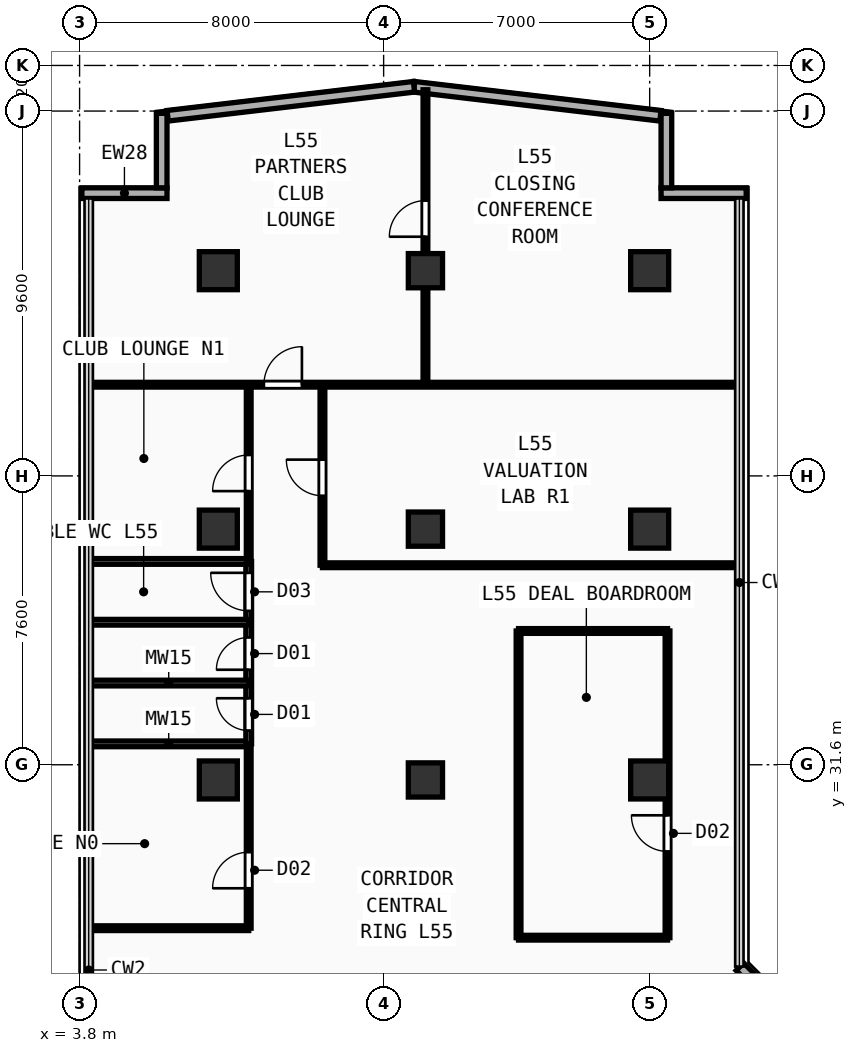
"""IFC4 building model, lengths in metres.
Left out: names, types, materials, properties, quantities, classifications, styles, units other than length and angle.
Written with IfcOpenShell. Run it as: python <this file> out.ifc"""

import sys

from ifc_helpers import new_model, si_unit, direction, frame, frame_2d, origin, origin_2d, place, context, subcontext, project, spatial, rectangle, extrude, element, fill, save


model = new_model("IFC4")
c1 = context("Model", 3, precision=1e-05, world=origin(), true_north=direction((0.0, 1.0)))
c2 = subcontext(c1, "Body", "Model", "MODEL_VIEW")
j1 = project(units=[si_unit("LENGTHUNIT", "METRE"), si_unit("PLANEANGLEUNIT", "RADIAN")], contexts=[c1])
p1 = place(None, origin())
s1 = spatial("IfcSite", under=j1, at=p1, CompositionType="ELEMENT")
p2 = place(p1, origin())
s2 = spatial("IfcBuilding", under=s1, at=p2, CompositionType="ELEMENT")
p3 = place(p2, frame((0.0, 0.0, 215.9)))
s3 = spatial("IfcBuildingStorey", under=s2, at=p3, CompositionType="ELEMENT", Elevation=215.9)
for number, where, z_axis, x_axis in (
    (1, (7.45, 31.2, 0.0), (0.0, 0.0, 1.0), (1.0, 0.0, 0.0)),
    (2, (7.45, 37.8, 0.0), (0.0, 0.0, 1.0), (1.0, 0.0, 0.0)),
    (3, (7.45, 44.6, 0.0), (0.0, 0.0, 1.0), (1.0, 0.0, 0.0)),
    (4, (18.8, 31.2, 0.0), (0.0, 0.0, 1.0), (1.0, 0.0, 0.0)),
    (5, (18.8, 37.8, 0.0), (0.0, 0.0, 1.0), (1.0, 0.0, 0.0)),
    (6, (18.8, 44.6, 0.0), (0.0, 0.0, 1.0), (1.0, 0.0, 0.0)),
):
    element("IfcColumn", number, at=place(p3, frame(where, z_axis=z_axis, x_axis=x_axis)), inside=s3, PredefinedType="COLUMN", context=c2, shape_type="SweptSolid", body=[
        extrude(rectangle(XDim=1.0, YDim=1.0, at=origin_2d()), origin(), (0.0, 0.0, 1.0), 3.56),
    ])
for number, where, z_axis, x_axis in (
    (7, (12.9, 31.2, 0.0), (0.0, 0.0, 1.0), (1.0, 0.0, 0.0)),
    (8, (12.9, 37.8, 0.0), (0.0, 0.0, 1.0), (1.0, 0.0, 0.0)),
    (9, (12.9, 44.6, 0.0), (0.0, 0.0, 1.0), (1.0, 0.0, 0.0)),
):
    element("IfcColumn", number, at=place(p3, frame(where, z_axis=z_axis, x_axis=x_axis)), inside=s3, PredefinedType="COLUMN", context=c2, shape_type="SweptSolid", body=[
        extrude(rectangle(XDim=0.9, YDim=0.9, at=origin_2d()), origin(), (0.0, 0.0, 1.0), 3.56),
    ])
p4 = place(p3, frame((19.1, 46.64, 0.0), z_axis=(0.0, 0.0, 1.0), x_axis=(1.0, 0.0, 0.0)))
e10 = element("IfcWall", 10, at=p4, inside=s3, PredefinedType="SOLIDWALL", context=c2, shape_type="SweptSolid", body=[
    extrude(rectangle(XDim=2.24, YDim=0.28, at=frame_2d((1.12, 0.0))), origin(), (0.0, 0.0, 1.0), 3.56),
])
p5 = place(p3, frame((19.24, 46.78, 0.0), z_axis=(0.0, 0.0, 1.0), x_axis=(0.0, 1.0, 0.0)))
e11 = element("IfcWall", 11, at=p5, inside=s3, PredefinedType="SOLIDWALL", context=c2, shape_type="SweptSolid", body=[
    extrude(rectangle(XDim=1.96, YDim=0.28, at=frame_2d((0.98, 0.0))), origin(), (0.0, 0.0, 1.0), 3.56),
])
p6 = place(p3, frame((3.86, 46.64, 0.0), z_axis=(0.0, 0.0, 1.0), x_axis=(1.0, 0.0, 0.0)))
e12 = element("IfcWall", 12, at=p6, inside=s3, PredefinedType="SOLIDWALL", context=c2, shape_type="SweptSolid", body=[
    extrude(rectangle(XDim=2.24, YDim=0.28, at=frame_2d((1.12, 0.0))), origin(), (0.0, 0.0, 1.0), 3.56),
])
p7 = place(p3, frame((5.96, 46.78, 0.0), z_axis=(0.0, 0.0, 1.0), x_axis=(0.0, 1.0, 0.0)))
e13 = element("IfcWall", 13, at=p7, inside=s3, PredefinedType="SOLIDWALL", context=c2, shape_type="SweptSolid", body=[
    extrude(rectangle(XDim=1.96, YDim=0.28, at=frame_2d((0.98, 0.0))), origin(), (0.0, 0.0, 1.0), 3.56),
])
p8 = place(p3, frame((27.685, 19.775, 0.0), z_axis=(0.0, 0.0, 1.0), x_axis=(-0.707106781187, 0.707106781187, 0.0)))
e14 = element("IfcWall", 14, at=p8, inside=s3, PredefinedType="SOLIDWALL", context=c2, shape_type="SweptSolid", body=[
    extrude(rectangle(XDim=9.207, YDim=0.28, at=frame_2d((4.603, 0.0))), origin(), (0.0, 0.0, 1.0), 3.56),
])
for number, where, z_axis, x_axis in (
    (15, (19.083, 48.676, 0.0), (0.0, 0.0, 1.0), (-0.993, 0.117, 0.0)),
    (16, (12.599, 49.439, 0.0), (0.0, 0.0, 1.0), (-0.993, -0.117, 0.0)),
):
    element("IfcWall", number, at=place(p3, frame(where, z_axis=z_axis, x_axis=x_axis)), inside=s3, PredefinedType="SOLIDWALL", context=c2, shape_type="SweptSolid", body=[
        extrude(rectangle(XDim=6.527, YDim=0.28, at=frame_2d((3.263, 0.0))), origin(), (0.0, 0.0, 1.0), 3.56),
    ])
for number, where, z_axis, x_axis in (
    (17, (15.35, 27.05, 0.0), (0.0, 0.0, 1.0), (1.0, 0.0, 0.0)),
    (18, (15.35, 35.12, 0.0), (0.0, 0.0, 1.0), (1.0, 0.0, 0.0)),
):
    element("IfcWall", number, at=place(p3, frame(where, z_axis=z_axis, x_axis=x_axis)), inside=s3, PredefinedType="PARTITIONING", context=c2, shape_type="SweptSolid", body=[
        extrude(rectangle(XDim=3.92, YDim=0.125, at=frame_2d((1.96, 0.0))), origin(), (0.0, 0.0, 1.0), 3.56),
    ])
p9 = place(p3, frame((15.35, 27.05, 0.0), z_axis=(0.0, 0.0, 1.0), x_axis=(0.0, 1.0, 0.0)))
e19 = element("IfcWall", 19, at=p9, inside=s3, PredefinedType="PARTITIONING", context=c2, shape_type="SweptSolid", body=[
    extrude(rectangle(XDim=8.07, YDim=0.125, at=frame_2d((4.035, 0.0))), origin(), (0.0, 0.0, 1.0), 3.56),
])
p10 = place(p3, frame((19.27, 27.05, 0.0), z_axis=(0.0, 0.0, 1.0), x_axis=(0.0, 1.0, 0.0)))
e20 = element("IfcWall", 20, at=p10, inside=s3, PredefinedType="PARTITIONING", context=c2, shape_type="SweptSolid", body=[
    extrude(rectangle(XDim=8.07, YDim=0.125, at=frame_2d((4.035, 0.0))), origin(), (0.0, 0.0, 1.0), 3.56),
])
p11 = place(p10, frame((2.27, 0.0, 0.0)))
e21 = element("IfcOpeningElement", 21, at=p11, cuts=e20, PredefinedType="OPENING", context=c2, shape_type="SweptSolid", body=[
    extrude(rectangle(XDim=0.95, YDim=2.15, at=frame_2d((0.475, 1.075))), frame((0.0, 0.073, 0.0), z_axis=(0.0, -1.0, 0.0), x_axis=(1.0, 0.0, 0.0)), (0.0, 0.0, 1.0), 0.145),
])
p12 = place(p3, frame((8.25, 27.3, 0.0), z_axis=(0.0, 0.0, 1.0), x_axis=(0.0, 1.0, 0.0)))
e22 = element("IfcWall", 22, at=p12, inside=s3, PredefinedType="PARTITIONING", context=c2, shape_type="SweptSolid", body=[
    extrude(rectangle(XDim=4.85, YDim=0.125, at=frame_2d((2.425, 0.0))), origin(), (0.0, 0.0, 1.0), 3.56),
])
p13 = place(p12, frame((1.05, 0.0, 0.0)))
e23 = element("IfcOpeningElement", 23, at=p13, cuts=e22, PredefinedType="OPENING", context=c2, shape_type="SweptSolid", body=[
    extrude(rectangle(XDim=0.95, YDim=2.15, at=frame_2d((0.475, 1.075))), frame((0.0, 0.073, 0.0), z_axis=(0.0, -1.0, 0.0), x_axis=(1.0, 0.0, 0.0)), (0.0, 0.0, 1.0), 0.145),
])
p14 = place(p3, frame((4.04, 27.3, 0.0), z_axis=(0.0, 0.0, 1.0), x_axis=(1.0, 0.0, 0.0)))
e24 = element("IfcWall", 24, at=p14, inside=s3, PredefinedType="PARTITIONING", context=c2, shape_type="SweptSolid", body=[
    extrude(rectangle(XDim=4.21, YDim=0.125, at=frame_2d((2.105, 0.0))), origin(), (0.0, 0.0, 1.0), 3.56),
])
p15 = place(p3, frame((4.04, 32.15, 0.0), z_axis=(0.0, 0.0, 1.0), x_axis=(1.0, 0.0, 0.0)))
e25 = element("IfcWall", 25, at=p15, inside=s3, PredefinedType="PLUMBINGWALL", context=c2, shape_type="SweptSolid", body=[
    extrude(rectangle(XDim=4.21, YDim=0.15, at=frame_2d((2.105, 0.0))), origin(), (0.0, 0.0, 1.0), 3.56),
])
p16 = place(p3, frame((8.25, 32.15, 0.0), z_axis=(0.0, 0.0, 1.0), x_axis=(0.0, 1.0, 0.0)))
e26 = element("IfcWall", 26, at=p16, inside=s3, PredefinedType="PLUMBINGWALL", context=c2, shape_type="SweptSolid", body=[
    extrude(rectangle(XDim=4.8, YDim=0.15, at=frame_2d((2.4, 0.0))), origin(), (0.0, 0.0, 1.0), 3.56),
])
p17 = place(p16, frame((0.35, 0.0, 0.0)))
e27 = element("IfcOpeningElement", 27, at=p17, cuts=e26, PredefinedType="OPENING", context=c2, shape_type="SweptSolid", body=[
    extrude(rectangle(XDim=0.85, YDim=2.15, at=frame_2d((0.425, 1.075))), frame((0.0, 0.085, 0.0), z_axis=(0.0, -1.0, 0.0), x_axis=(1.0, 0.0, 0.0)), (0.0, 0.0, 1.0), 0.17),
])
p18 = place(p16, frame((1.95, 0.0, 0.0)))
e28 = element("IfcOpeningElement", 28, at=p18, cuts=e26, PredefinedType="OPENING", context=c2, shape_type="SweptSolid", body=[
    extrude(rectangle(XDim=0.85, YDim=2.15, at=frame_2d((0.425, 1.075))), frame((0.0, 0.085, 0.0), z_axis=(0.0, -1.0, 0.0), x_axis=(1.0, 0.0, 0.0)), (0.0, 0.0, 1.0), 0.17),
])
p19 = place(p16, frame((3.5, 0.0, 0.0)))
e29 = element("IfcOpeningElement", 29, at=p19, cuts=e26, PredefinedType="OPENING", context=c2, shape_type="SweptSolid", body=[
    extrude(rectangle(XDim=1.0, YDim=2.2, at=frame_2d((0.5, 1.1))), frame((0.0, 0.085, 0.0), z_axis=(0.0, -1.0, 0.0), x_axis=(1.0, 0.0, 0.0)), (0.0, 0.0, 1.0), 0.17),
])
for number, where, z_axis, x_axis in (
    (30, (4.04, 33.75, 0.0), (0.0, 0.0, 1.0), (1.0, 0.0, 0.0)),
    (31, (4.04, 35.35, 0.0), (0.0, 0.0, 1.0), (1.0, 0.0, 0.0)),
):
    element("IfcWall", number, at=place(p3, frame(where, z_axis=z_axis, x_axis=x_axis)), inside=s3, PredefinedType="PLUMBINGWALL", context=c2, shape_type="SweptSolid", body=[
        extrude(rectangle(XDim=4.21, YDim=0.15, at=frame_2d((2.105, 0.0))), origin(), (0.0, 0.0, 1.0), 3.2),
    ])
p20 = place(p3, frame((4.04, 36.95, 0.0), z_axis=(0.0, 0.0, 1.0), x_axis=(1.0, 0.0, 0.0)))
e32 = element("IfcWall", 32, at=p20, inside=s3, PredefinedType="PLUMBINGWALL", context=c2, shape_type="SweptSolid", body=[
    extrude(rectangle(XDim=4.21, YDim=0.15, at=frame_2d((2.105, 0.0))), origin(), (0.0, 0.0, 1.0), 3.56),
])
p21 = place(p3, frame((8.25, 36.95, 0.0), z_axis=(0.0, 0.0, 1.0), x_axis=(0.0, 1.0, 0.0)))
e33 = element("IfcWall", 33, at=p21, inside=s3, PredefinedType="PARTITIONING", context=c2, shape_type="SweptSolid", body=[
    extrude(rectangle(XDim=4.65, YDim=0.125, at=frame_2d((2.325, 0.0))), origin(), (0.0, 0.0, 1.0), 3.56),
])
p22 = place(p21, frame((1.85, 0.0, 0.0)))
e34 = element("IfcOpeningElement", 34, at=p22, cuts=e33, PredefinedType="OPENING", context=c2, shape_type="SweptSolid", body=[
    extrude(rectangle(XDim=0.95, YDim=2.15, at=frame_2d((0.475, 1.075))), frame((0.0, 0.073, 0.0), z_axis=(0.0, -1.0, 0.0), x_axis=(1.0, 0.0, 0.0)), (0.0, 0.0, 1.0), 0.145),
])
p23 = place(p3, frame((4.04, 41.6, 0.0), z_axis=(0.0, 0.0, 1.0), x_axis=(1.0, 0.0, 0.0)))
e35 = element("IfcWall", 35, at=p23, inside=s3, PredefinedType="PARTITIONING", context=c2, shape_type="SweptSolid", body=[
    extrude(rectangle(XDim=17.12, YDim=0.125, at=frame_2d((8.56, 0.0))), origin(), (0.0, 0.0, 1.0), 3.56),
])
p24 = place(p23, frame((4.61, 0.0, 0.0)))
e36 = element("IfcOpeningElement", 36, at=p24, cuts=e35, PredefinedType="OPENING", context=c2, shape_type="SweptSolid", body=[
    extrude(rectangle(XDim=1.0, YDim=2.2, at=frame_2d((0.5, 1.1))), frame((0.0, 0.073, 0.0), z_axis=(0.0, -1.0, 0.0), x_axis=(1.0, 0.0, 0.0)), (0.0, 0.0, 1.0), 0.145),
])
p25 = place(p3, frame((12.9, 41.6, 0.0), z_axis=(0.0, 0.0, 1.0), x_axis=(0.0, 1.0, 0.0)))
e37 = element("IfcWall", 37, at=p25, inside=s3, PredefinedType="PARTITIONING", context=c2, shape_type="SweptSolid", body=[
    extrude(rectangle(XDim=7.76, YDim=0.125, at=frame_2d((3.88, 0.0))), origin(), (0.0, 0.0, 1.0), 3.16),
])
p26 = place(p25, frame((3.894, 0.0, 0.0)))
e38 = element("IfcOpeningElement", 38, at=p26, cuts=e37, PredefinedType="OPENING", context=c2, shape_type="SweptSolid", body=[
    extrude(rectangle(XDim=0.95, YDim=2.15, at=frame_2d((0.475, 1.075))), frame((0.0, 0.073, 0.0), z_axis=(0.0, -1.0, 0.0), x_axis=(1.0, 0.0, 0.0)), (0.0, 0.0, 1.0), 0.145),
])
p27 = place(p3, frame((10.19, 36.85, 0.0), z_axis=(0.0, 0.0, 1.0), x_axis=(1.0, 0.0, 0.0)))
e39 = element("IfcWall", 39, at=p27, inside=s3, PredefinedType="PARTITIONING", context=c2, shape_type="SweptSolid", body=[
    extrude(rectangle(XDim=10.97, YDim=0.125, at=frame_2d((5.485, 0.0))), origin(), (0.0, 0.0, 1.0), 3.56),
])
p28 = place(p3, frame((10.19, 36.85, 0.0), z_axis=(0.0, 0.0, 1.0), x_axis=(0.0, 1.0, 0.0)))
e40 = element("IfcWall", 40, at=p28, inside=s3, PredefinedType="PARTITIONING", context=c2, shape_type="SweptSolid", body=[
    extrude(rectangle(XDim=4.75, YDim=0.125, at=frame_2d((2.375, 0.0))), origin(), (0.0, 0.0, 1.0), 3.56),
])
p29 = place(p28, frame((1.829, 0.0, 0.0)))
e41 = element("IfcOpeningElement", 41, at=p29, cuts=e40, PredefinedType="OPENING", context=c2, shape_type="SweptSolid", body=[
    extrude(rectangle(XDim=0.95, YDim=2.15, at=frame_2d((0.475, 1.075))), frame((0.0, 0.073, 0.0), z_axis=(0.0, -1.0, 0.0), x_axis=(1.0, 0.0, 0.0)), (0.0, 0.0, 1.0), 0.145),
])
p30 = place(p11, origin())
e42 = element("IfcDoor", 42, at=p30, inside=s3, OperationType="SINGLE_SWING_RIGHT", PredefinedType="DOOR", context=c2, shape_type="SweptSolid", body=[
    extrude(rectangle(XDim=0.95, YDim=2.15, at=frame_2d((0.475, 1.075))), frame((0.0, 0.025, 0.0), z_axis=(0.0, -1.0, 0.0), x_axis=(1.0, 0.0, 0.0)), (0.0, 0.0, 1.0), 0.05),
])
fill(e21, e42)
p31 = place(p13, origin())
e43 = element("IfcDoor", 43, at=p31, inside=s3, OperationType="SINGLE_SWING_LEFT", PredefinedType="DOOR", context=c2, shape_type="SweptSolid", body=[
    extrude(rectangle(XDim=0.95, YDim=2.15, at=frame_2d((0.475, 1.075))), frame((0.0, 0.025, 0.0), z_axis=(0.0, -1.0, 0.0), x_axis=(1.0, 0.0, 0.0)), (0.0, 0.0, 1.0), 0.05),
])
fill(e23, e43)
p32 = place(p17, origin())
e44 = element("IfcDoor", 44, at=p32, inside=s3, OperationType="SINGLE_SWING_RIGHT", PredefinedType="DOOR", context=c2, shape_type="SweptSolid", body=[
    extrude(rectangle(XDim=0.85, YDim=2.15, at=frame_2d((0.425, 1.075))), frame((0.0, 0.025, 0.0), z_axis=(0.0, -1.0, 0.0), x_axis=(1.0, 0.0, 0.0)), (0.0, 0.0, 1.0), 0.05),
])
fill(e27, e44)
p33 = place(p18, origin())
e45 = element("IfcDoor", 45, at=p33, inside=s3, OperationType="SINGLE_SWING_LEFT", PredefinedType="DOOR", context=c2, shape_type="SweptSolid", body=[
    extrude(rectangle(XDim=0.85, YDim=2.15, at=frame_2d((0.425, 1.075))), frame((0.0, 0.025, 0.0), z_axis=(0.0, -1.0, 0.0), x_axis=(1.0, 0.0, 0.0)), (0.0, 0.0, 1.0), 0.05),
])
fill(e28, e45)
p34 = place(p19, origin())
e46 = element("IfcDoor", 46, at=p34, inside=s3, OperationType="SINGLE_SWING_RIGHT", PredefinedType="DOOR", context=c2, shape_type="SweptSolid", body=[
    extrude(rectangle(XDim=1.0, YDim=2.2, at=frame_2d((0.5, 1.1))), frame((0.0, 0.025, 0.0), z_axis=(0.0, -1.0, 0.0), x_axis=(1.0, 0.0, 0.0)), (0.0, 0.0, 1.0), 0.05),
])
fill(e29, e46)
p35 = place(p22, origin())
e47 = element("IfcDoor", 47, at=p35, inside=s3, OperationType="SINGLE_SWING_LEFT", PredefinedType="DOOR", context=c2, shape_type="SweptSolid", body=[
    extrude(rectangle(XDim=0.95, YDim=2.15, at=frame_2d((0.475, 1.075))), frame((0.0, 0.025, 0.0), z_axis=(0.0, -1.0, 0.0), x_axis=(1.0, 0.0, 0.0)), (0.0, 0.0, 1.0), 0.05),
])
fill(e34, e47)
p36 = place(p24, origin())
e48 = element("IfcDoor", 48, at=p36, inside=s3, OperationType="SINGLE_SWING_RIGHT", PredefinedType="DOOR", context=c2, shape_type="SweptSolid", body=[
    extrude(rectangle(XDim=1.0, YDim=2.2, at=frame_2d((0.5, 1.1))), frame((0.0, 0.025, 0.0), z_axis=(0.0, -1.0, 0.0), x_axis=(1.0, 0.0, 0.0)), (0.0, 0.0, 1.0), 0.05),
])
fill(e36, e48)
p37 = place(p26, origin())
e49 = element("IfcDoor", 49, at=p37, inside=s3, OperationType="SINGLE_SWING_LEFT", PredefinedType="DOOR", context=c2, shape_type="SweptSolid", body=[
    extrude(rectangle(XDim=0.95, YDim=2.15, at=frame_2d((0.475, 1.075))), frame((0.0, 0.025, 0.0), z_axis=(0.0, -1.0, 0.0), x_axis=(1.0, 0.0, 0.0)), (0.0, 0.0, 1.0), 0.05),
])
fill(e38, e49)
p38 = place(p29, origin())
e50 = element("IfcDoor", 50, at=p38, inside=s3, OperationType="SINGLE_SWING_RIGHT", PredefinedType="DOOR", context=c2, shape_type="SweptSolid", body=[
    extrude(rectangle(XDim=0.95, YDim=2.15, at=frame_2d((0.475, 1.075))), frame((0.0, 0.025, 0.0), z_axis=(0.0, -1.0, 0.0), x_axis=(1.0, 0.0, 0.0)), (0.0, 0.0, 1.0), 0.05),
])
fill(e41, e50)
save(model, sys.argv[1])
